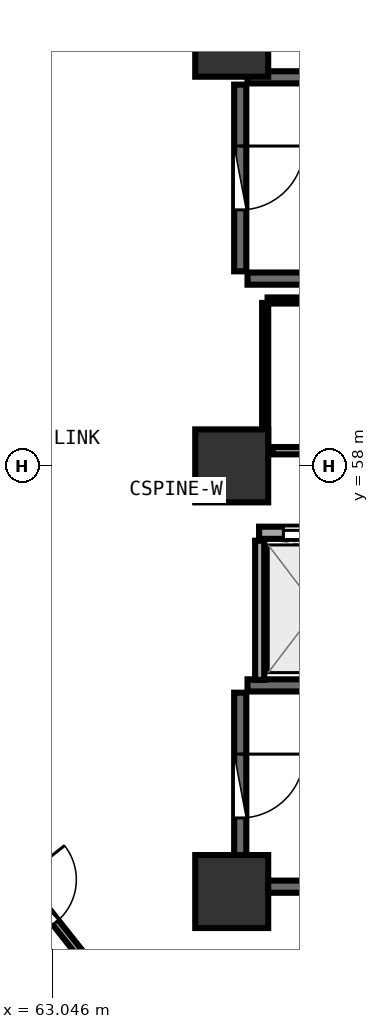
"""IFC4 building model, lengths in metres.
Left out: names, types, materials, properties, quantities, classifications, styles, units other than length and angle.
Written with IfcOpenShell. Run it as: python <this file> out.ifc"""

import sys

from ifc_helpers import new_model, si_unit, direction, frame, frame_2d, origin, origin_2d, place, context, subcontext, project, spatial, rectangle, extrude, element, fill, save


model = new_model("IFC4")
c1 = context("Model", 3, precision=1e-05, world=origin(), true_north=direction((0.0, 1.0)))
c2 = subcontext(c1, "Body", "Model", "MODEL_VIEW")
j1 = project(units=[si_unit("LENGTHUNIT", "METRE"), si_unit("PLANEANGLEUNIT", "RADIAN")], contexts=[c1])
p1 = place(None, origin())
s1 = spatial("IfcSite", under=j1, at=p1, CompositionType="ELEMENT")
p2 = place(p1, origin())
s2 = spatial("IfcBuilding", under=s1, at=p2, CompositionType="ELEMENT")
p3 = place(p2, frame((0.0, 0.0, 180.6)))
s3 = spatial("IfcBuildingStorey", under=s2, at=p3, CompositionType="ELEMENT", Elevation=180.6)
for number, where, z_axis, x_axis in (
    (1, (66.0, 51.0, 0.0), (0.0, 0.0, 1.0), (1.0, 0.0, 0.0)),
    (2, (66.0, 65.0, 0.0), (0.0, 0.0, 1.0), (1.0, 0.0, 0.0)),
    (3, (66.0, 58.0, 0.0), (0.0, 0.0, 1.0), (1.0, 0.0, 0.0)),
):
    element("IfcColumn", number, at=place(p3, frame(where, z_axis=z_axis, x_axis=x_axis)), inside=s3, PredefinedType="PILASTER", context=c2, shape_type="SweptSolid", body=[
        extrude(rectangle(XDim=1.2, YDim=1.2, at=origin_2d()), origin(), (0.0, 0.0, 1.0), 3.75),
    ])
for number, where, z_axis, x_axis in (
    (4, (66.26, 61.08, 0.0), (0.0, 0.0, 1.0), (1.0, 0.0, 0.0)),
    (5, (73.42, 64.39, 0.0), (0.0, 0.0, 1.0), (-1.0, 0.0, 0.0)),
):
    element("IfcWall", number, at=place(p3, frame(where, z_axis=z_axis, x_axis=x_axis)), inside=s3, PredefinedType="SHEAR", context=c2, shape_type="SweptSolid", body=[
        extrude(rectangle(XDim=7.16, YDim=0.2, at=frame_2d((3.58, 0.0))), origin(), (0.0, 0.0, 1.0), 3.49),
    ])
p4 = place(p3, frame((66.14, 64.27, 0.0), z_axis=(0.0, 0.0, 1.0), x_axis=(0.0, -1.0, 0.0)))
e6 = element("IfcWall", 6, at=p4, inside=s3, PredefinedType="SHEAR", context=c2, shape_type="SweptSolid", body=[
    extrude(rectangle(XDim=3.07, YDim=0.2, at=frame_2d((1.535, 0.0))), origin(), (0.0, 0.0, 1.0), 3.49),
])
p5 = place(p4, frame((1.01, 0.0, 0.0)))
e7 = element("IfcOpeningElement", 7, at=p5, cuts=e6, PredefinedType="OPENING", context=c2, shape_type="SweptSolid", body=[
    extrude(rectangle(XDim=1.05, YDim=2.1, at=frame_2d((0.525, 1.05))), frame((0.0, 0.11, 0.0), z_axis=(0.0, -1.0, 0.0), x_axis=(1.0, 0.0, 0.0)), (0.0, 0.0, 1.0), 0.22),
])
for number, where, z_axis, x_axis in (
    (8, (66.26, 51.08, 0.0), (0.0, 0.0, 1.0), (1.0, 0.0, 0.0)),
    (9, (73.42, 54.39, 0.0), (0.0, 0.0, 1.0), (-1.0, 0.0, 0.0)),
):
    element("IfcWall", number, at=place(p3, frame(where, z_axis=z_axis, x_axis=x_axis)), inside=s3, PredefinedType="SHEAR", context=c2, shape_type="SweptSolid", body=[
        extrude(rectangle(XDim=7.16, YDim=0.2, at=frame_2d((3.58, 0.0))), origin(), (0.0, 0.0, 1.0), 3.49),
    ])
p6 = place(p3, frame((66.14, 54.27, 0.0), z_axis=(0.0, 0.0, 1.0), x_axis=(0.0, -1.0, 0.0)))
e10 = element("IfcWall", 10, at=p6, inside=s3, PredefinedType="SHEAR", context=c2, shape_type="SweptSolid", body=[
    extrude(rectangle(XDim=3.07, YDim=0.2, at=frame_2d((1.535, 0.0))), origin(), (0.0, 0.0, 1.0), 3.49),
])
p7 = place(p6, frame((1.01, 0.0, 0.0)))
e11 = element("IfcOpeningElement", 11, at=p7, cuts=e10, PredefinedType="OPENING", context=c2, shape_type="SweptSolid", body=[
    extrude(rectangle(XDim=1.05, YDim=2.1, at=frame_2d((0.525, 1.05))), frame((0.0, 0.11, 0.0), z_axis=(0.0, -1.0, 0.0), x_axis=(1.0, 0.0, 0.0)), (0.0, 0.0, 1.0), 0.22),
])
p8 = place(p3, frame((66.45, 56.9, 0.0), z_axis=(0.0, 0.0, 1.0), x_axis=(1.0, 0.0, 0.0)))
e12 = element("IfcWall", 12, at=p8, inside=s3, PredefinedType="SOLIDWALL", context=c2, shape_type="SweptSolid", body=[
    extrude(rectangle(XDim=14.4, YDim=0.2, at=frame_2d((7.2, 0.0))), origin(), (0.0, 0.0, 1.0), 3.48),
])
p9 = place(p8, frame((0.4, 0.0, 0.0)))
e13 = element("IfcOpeningElement", 13, at=p9, cuts=e12, PredefinedType="OPENING", context=c2, shape_type="SweptSolid", body=[
    extrude(rectangle(XDim=1.1, YDim=2.1, at=frame_2d((0.55, 1.05))), frame((0.0, 0.11, 0.0), z_axis=(0.0, -1.0, 0.0), x_axis=(1.0, 0.0, 0.0)), (0.0, 0.0, 1.0), 0.22),
])
p10 = place(p8, frame((2.4, 0.0, 0.0)))
e14 = element("IfcOpeningElement", 14, at=p10, cuts=e12, PredefinedType="OPENING", context=c2, shape_type="SweptSolid", body=[
    extrude(rectangle(XDim=1.1, YDim=2.1, at=frame_2d((0.55, 1.05))), frame((0.0, 0.11, 0.0), z_axis=(0.0, -1.0, 0.0), x_axis=(1.0, 0.0, 0.0)), (0.0, 0.0, 1.0), 0.22),
])
p11 = place(p8, frame((4.4, 0.0, 0.0)))
e15 = element("IfcOpeningElement", 15, at=p11, cuts=e12, PredefinedType="OPENING", context=c2, shape_type="SweptSolid", body=[
    extrude(rectangle(XDim=1.1, YDim=2.1, at=frame_2d((0.55, 1.05))), frame((0.0, 0.11, 0.0), z_axis=(0.0, -1.0, 0.0), x_axis=(1.0, 0.0, 0.0)), (0.0, 0.0, 1.0), 0.22),
])
p12 = place(p3, frame((66.46, 54.48, 0.0), z_axis=(0.0, 0.0, 1.0), x_axis=(0.0, 1.0, 0.0)))
e16 = element("IfcWall", 16, at=p12, inside=s3, PredefinedType="PARTITIONING", context=c2, shape_type="SweptSolid", body=[
    extrude(rectangle(XDim=2.29, YDim=0.15, at=frame_2d((1.145, 0.0))), origin(), (0.0, 0.0, 1.0), 3.48),
])
p13 = place(p3, frame((66.675, 58.25, 0.0), z_axis=(0.0, 0.0, 1.0), x_axis=(1.0, 0.0, 0.0)))
e17 = element("IfcWall", 17, at=p13, inside=s3, PredefinedType="PARTITIONING", context=c2, shape_type="SweptSolid", body=[
    extrude(rectangle(XDim=3.265, YDim=0.12, at=frame_2d((1.632, 0.0))), origin(), (0.0, 0.0, 1.0), 3.48),
])
p14 = place(p13, frame((1.182, 0.0, 0.0)))
e18 = element("IfcOpeningElement", 18, at=p14, cuts=e17, PredefinedType="OPENING", context=c2, shape_type="SweptSolid", body=[
    extrude(rectangle(XDim=0.9, YDim=2.08, at=frame_2d((0.45, 1.04))), frame((0.0, 0.07, 0.0), z_axis=(0.0, -1.0, 0.0), x_axis=(1.0, 0.0, 0.0)), (0.0, 0.0, 1.0), 0.14),
])
p15 = place(p3, frame((61.86, 52.06, 0.0), z_axis=(0.0, 0.0, 1.0), x_axis=(0.621061577605, -0.783761773005, 0.0)))
e19 = element("IfcWall", 19, at=p15, inside=s3, PredefinedType="PARTITIONING", context=c2, shape_type="SweptSolid", body=[
    extrude(rectangle(XDim=3.103, YDim=0.12, at=frame_2d((1.552, 0.0))), origin(), (0.0, 0.0, 1.0), 2.975),
])
p16 = place(p15, frame((1.102, 0.0, 0.0)))
e20 = element("IfcOpeningElement", 20, at=p16, cuts=e19, PredefinedType="OPENING", context=c2, shape_type="SweptSolid", body=[
    extrude(rectangle(XDim=0.9, YDim=2.08, at=frame_2d((0.45, 1.04))), frame((0.0, 0.07, 0.0), z_axis=(0.0, -1.0, 0.0), x_axis=(1.0, 0.0, 0.0)), (0.0, 0.0, 1.0), 0.14),
])
p17 = place(p3, frame((69.96, 60.72, 0.0), z_axis=(0.0, 0.0, 1.0), x_axis=(-1.0, 0.0, 0.0)))
e21 = element("IfcWall", 21, at=p17, inside=s3, PredefinedType="PARTITIONING", context=c2, shape_type="SweptSolid", body=[
    extrude(rectangle(XDim=3.37, YDim=0.1, at=frame_2d((1.685, 0.0))), origin(), (0.0, 0.0, 1.0), 3.48),
])
p18 = place(p3, frame((66.55, 60.68, 0.0), z_axis=(0.0, 0.0, 1.0), x_axis=(0.0, -1.0, 0.0)))
e22 = element("IfcWall", 22, at=p18, inside=s3, PredefinedType="PARTITIONING", context=c2, shape_type="SweptSolid", body=[
    extrude(rectangle(XDim=2.383, YDim=0.1, at=frame_2d((1.191, 0.0))), origin(), (0.0, 0.0, 1.0), 3.48),
])
p19 = place(p5, origin())
e23 = element("IfcDoor", 23, at=p19, inside=s3, OperationType="SINGLE_SWING_LEFT", PredefinedType="DOOR", context=c2, shape_type="SweptSolid", body=[
    extrude(rectangle(XDim=1.05, YDim=2.1, at=frame_2d((0.525, 1.05))), frame((0.0, 0.025, 0.0), z_axis=(0.0, -1.0, 0.0), x_axis=(1.0, 0.0, 0.0)), (0.0, 0.0, 1.0), 0.05),
])
fill(e7, e23)
p20 = place(p7, origin())
e24 = element("IfcDoor", 24, at=p20, inside=s3, OperationType="SINGLE_SWING_LEFT", PredefinedType="DOOR", context=c2, shape_type="SweptSolid", body=[
    extrude(rectangle(XDim=1.05, YDim=2.1, at=frame_2d((0.525, 1.05))), frame((0.0, 0.025, 0.0), z_axis=(0.0, -1.0, 0.0), x_axis=(1.0, 0.0, 0.0)), (0.0, 0.0, 1.0), 0.05),
])
fill(e11, e24)
p21 = place(p9, origin())
e25 = element("IfcDoor", 25, at=p21, inside=s3, OperationType="DOUBLE_DOOR_SLIDING", PredefinedType="DOOR", context=c2, shape_type="SweptSolid", body=[
    extrude(rectangle(XDim=1.1, YDim=2.1, at=frame_2d((0.55, 1.05))), frame((0.0, 0.025, 0.0), z_axis=(0.0, -1.0, 0.0), x_axis=(1.0, 0.0, 0.0)), (0.0, 0.0, 1.0), 0.05),
])
fill(e13, e25)
p22 = place(p16, origin())
e26 = element("IfcDoor", 26, at=p22, inside=s3, OperationType="SINGLE_SWING_LEFT", PredefinedType="DOOR", context=c2, shape_type="SweptSolid", body=[
    extrude(rectangle(XDim=0.9, YDim=2.08, at=frame_2d((0.45, 1.04))), frame((0.0, 0.025, 0.0), z_axis=(0.0, -1.0, 0.0), x_axis=(1.0, 0.0, 0.0)), (0.0, 0.0, 1.0), 0.05),
])
fill(e20, e26)
save(model, sys.argv[1])
